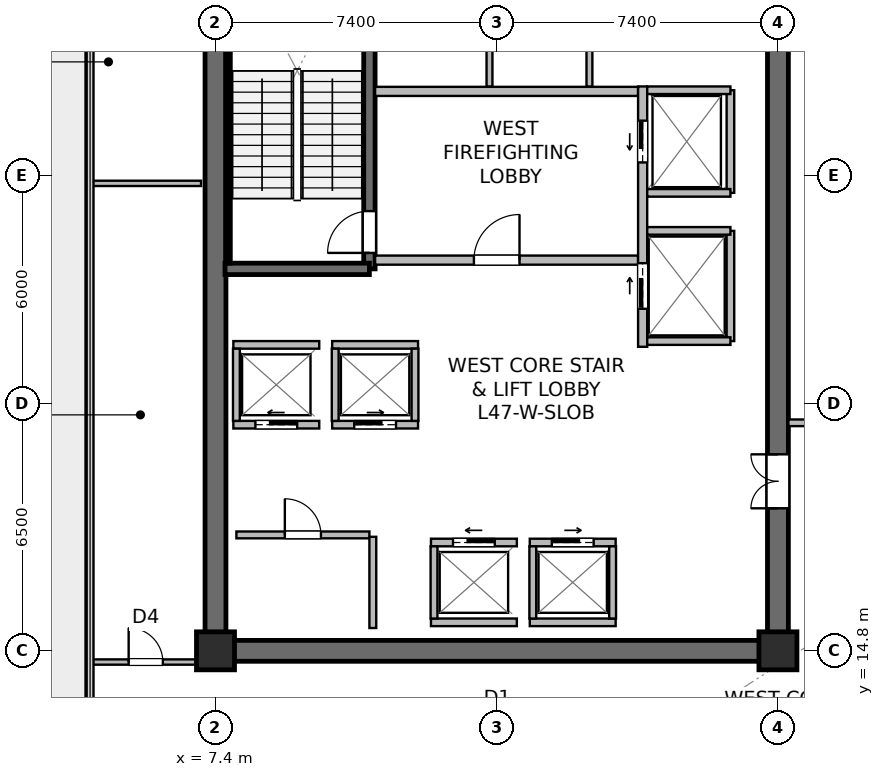
"""IFC4 building model, lengths in metres.
Left out: names, types, materials, properties, quantities, classifications, styles, units other than length and angle.
Written with IfcOpenShell. Run it as: python <this file> out.ifc"""

import sys

from ifc_helpers import new_model, si_unit, direction, frame, frame_2d, origin, origin_2d, place, context, subcontext, project, spatial, rectangle, extrude, source, transform, mapped, element, fill, save


model = new_model("IFC4")
c1 = context("Model", 3, precision=1e-05, world=origin(), true_north=direction((0.0, 1.0)))
c2 = subcontext(c1, "Body", "Model", "MODEL_VIEW")
j1 = project(units=[si_unit("LENGTHUNIT", "METRE"), si_unit("PLANEANGLEUNIT", "RADIAN")], contexts=[c1])
p1 = place(None, origin())
s1 = spatial("IfcSite", under=j1, at=p1, CompositionType="ELEMENT")
p2 = place(p1, origin())
s2 = spatial("IfcBuilding", under=s1, at=p2, CompositionType="ELEMENT")
p3 = place(p2, frame((0.0, 0.0, 196.6)))
s3 = spatial("IfcBuildingStorey", under=s2, at=p3, CompositionType="ELEMENT", Elevation=196.6)
p4 = place(p3, frame((7.125, 14.8, 0.0), z_axis=(0.0, 0.0, 1.0), x_axis=(1.0, 0.0, 0.0)))
e1 = element("IfcWall", 1, at=p4, inside=s3, PredefinedType="SHEAR", context=c2, shape_type="SweptSolid", body=[
    extrude(rectangle(XDim=15.35, YDim=0.55, at=frame_2d((7.675, 0.0))), origin(), (0.0, 0.0, 1.0), 4.5),
])
p5 = place(p3, frame((7.4, 15.075, 0.0), z_axis=(0.0, 0.0, 1.0), x_axis=(0.0, 1.0, 0.0)))
e2 = element("IfcWall", 2, at=p5, inside=s3, PredefinedType="SHEAR", context=c2, shape_type="SweptSolid", body=[
    extrude(rectangle(XDim=18.45, YDim=0.55, at=frame_2d((9.225, 0.0))), origin(), (0.0, 0.0, 1.0), 4.5),
])
p6 = place(p3, frame((22.2, 15.075, 0.0), z_axis=(0.0, 0.0, 1.0), x_axis=(0.0, 1.0, 0.0)))
e3 = element("IfcWall", 3, at=p6, inside=s3, PredefinedType="SHEAR", context=c2, shape_type="SweptSolid", body=[
    extrude(rectangle(XDim=18.45, YDim=0.55, at=frame_2d((9.225, 0.0))), origin(), (0.0, 0.0, 1.0), 4.5),
])
p7 = place(p6, frame((3.475, 0.0, 0.0)))
e4 = element("IfcOpeningElement", 4, at=p7, cuts=e3, PredefinedType="OPENING", context=c2, shape_type="SweptSolid", body=[
    extrude(rectangle(XDim=1.42, YDim=2.2, at=frame_2d((0.71, 1.1))), frame((0.0, 0.285, 0.0), z_axis=(0.0, -1.0, 0.0), x_axis=(1.0, 0.0, 0.0)), (0.0, 0.0, 1.0), 0.57),
])
p8 = place(p3, frame((11.45, 24.85, 0.0), z_axis=(0.0, 0.0, 1.0), x_axis=(0.0, 1.0, 0.0)))
e5 = element("IfcWall", 5, at=p8, inside=s3, PredefinedType="SHEAR", context=c2, shape_type="SweptSolid", body=[
    extrude(rectangle(XDim=8.63, YDim=0.3, at=frame_2d((4.315, 0.0))), origin(), (0.0, 0.0, 1.0), 4.5),
])
p9 = place(p8, frame((0.42, 0.0, 0.0)))
e6 = element("IfcOpeningElement", 6, at=p9, cuts=e5, PredefinedType="OPENING", context=c2, shape_type="SweptSolid", body=[
    extrude(rectangle(XDim=1.1, YDim=2.15, at=frame_2d((0.55, 1.075))), frame((0.0, 0.16, 0.0), z_axis=(0.0, -1.0, 0.0), x_axis=(1.0, 0.0, 0.0)), (0.0, 0.0, 1.0), 0.32),
])
p10 = place(p3, frame((7.65, 24.85, 0.0), z_axis=(0.0, 0.0, 1.0), x_axis=(1.0, 0.0, 0.0)))
e7 = element("IfcWall", 7, at=p10, inside=s3, PredefinedType="SHEAR", context=c2, shape_type="SweptSolid", body=[
    extrude(rectangle(XDim=3.8, YDim=0.3, at=frame_2d((1.9, 0.0))), origin(), (0.0, 0.0, 1.0), 4.5),
])
p11 = place(p3, frame((7.73, 25.0, 0.0), z_axis=(0.0, 0.0, 1.0), x_axis=(0.0, 1.0, 0.0)))
e8 = element("IfcWall", 8, at=p11, inside=s3, PredefinedType="SOLIDWALL", context=c2, shape_type="SweptSolid", body=[
    extrude(rectangle(XDim=8.32, YDim=0.12, at=frame_2d((4.16, 0.0))), origin(), (0.0, 0.0, 1.0), 4.5),
])
m1 = source(origin(), c2, "Body", "SweptSolid", [
    extrude(rectangle(XDim=1.0, YDim=1.0, at=origin_2d()), origin(), (0.0, 0.0, 1.0), 4.8),
])
for number, where, z_axis, x_axis in (
    (9, (7.4, 14.8, 0.0), (0.0, 0.0, 1.0), (1.0, 0.0, 0.0)),
    (10, (22.2, 14.8, 0.0), (0.0, 0.0, 1.0), (1.0, 0.0, 0.0)),
):
    element("IfcColumn", number, at=place(p3, frame(where, z_axis=z_axis, x_axis=x_axis)), inside=s3, PredefinedType="COLUMN", context=c2, shape_type="MappedRepresentation", body=[
        mapped(m1, transform((0.0, 0.0, 0.0), scale=1.0)),
    ])
p12 = place(p3, frame((11.6, 25.08, 0.0), z_axis=(0.0, 0.0, 1.0), x_axis=(1.0, 0.0, 0.0)))
e11 = element("IfcWall", 11, at=p12, inside=s3, PredefinedType="SOLIDWALL", context=c2, shape_type="SweptSolid", body=[
    extrude(rectangle(XDim=6.92, YDim=0.24, at=frame_2d((3.46, 0.0))), origin(), (0.0, 0.0, 1.0), 3.897),
])
p13 = place(p12, frame((2.6, 0.0, 0.0)))
e12 = element("IfcOpeningElement", 12, at=p13, cuts=e11, PredefinedType="OPENING", context=c2, shape_type="SweptSolid", body=[
    extrude(rectangle(XDim=1.2, YDim=2.16, at=frame_2d((0.6, 1.08))), frame((0.0, 0.13, 0.0), z_axis=(0.0, -1.0, 0.0), x_axis=(1.0, 0.0, 0.0)), (0.0, 0.0, 1.0), 0.26),
])
p14 = place(p3, frame((11.6, 29.52, 0.0), z_axis=(0.0, 0.0, 1.0), x_axis=(1.0, 0.0, 0.0)))
e13 = element("IfcWall", 13, at=p14, inside=s3, PredefinedType="SOLIDWALL", context=c2, shape_type="SweptSolid", body=[
    extrude(rectangle(XDim=6.92, YDim=0.24, at=frame_2d((3.46, 0.0))), origin(), (0.0, 0.0, 1.0), 3.897),
])
p15 = place(p3, frame((18.64, 22.8, 0.0), z_axis=(0.0, 0.0, 1.0), x_axis=(0.0, 1.0, 0.0)))
e14 = element("IfcWall", 14, at=p15, inside=s3, PredefinedType="SOLIDWALL", context=c2, shape_type="SweptSolid", body=[
    extrude(rectangle(XDim=6.85, YDim=0.24, at=frame_2d((3.425, 0.0))), origin(), (0.0, 0.0, 1.0), 3.635),
])
p16 = place(p15, frame((4.85, 0.0, 0.0)))
e15 = element("IfcOpeningElement", 15, at=p16, cuts=e14, PredefinedType="OPENING", context=c2, shape_type="SweptSolid", body=[
    extrude(rectangle(XDim=1.1, YDim=2.22, at=frame_2d((0.55, 1.11))), frame((0.0, 0.13, 0.0), z_axis=(0.0, -1.0, 0.0), x_axis=(1.0, 0.0, 0.0)), (0.0, 0.0, 1.0), 0.26),
])
p17 = place(p15, frame((1.0, 0.0, 0.0)))
e16 = element("IfcOpeningElement", 16, at=p17, cuts=e14, PredefinedType="OPENING", context=c2, shape_type="SweptSolid", body=[
    extrude(rectangle(XDim=1.2, YDim=2.22, at=frame_2d((0.6, 1.11))), frame((0.0, 0.13, 0.0), z_axis=(0.0, -1.0, 0.0), x_axis=(1.0, 0.0, 0.0)), (0.0, 0.0, 1.0), 0.26),
])
p18 = place(p3, frame((13.07, 17.65, 0.0), z_axis=(0.0, 0.0, 1.0), x_axis=(1.0, 0.0, 0.0)))
e17 = element("IfcWall", 17, at=p18, inside=s3, PredefinedType="SOLIDWALL", context=c2, shape_type="SweptSolid", body=[
    extrude(rectangle(XDim=2.26, YDim=0.2, at=frame_2d((1.13, 0.0))), origin(), (0.0, 0.0, 1.0), 3.897),
])
p19 = place(p18, frame((0.58, 0.0, 0.0)))
e18 = element("IfcOpeningElement", 18, at=p19, cuts=e17, PredefinedType="OPENING", context=c2, shape_type="SweptSolid", body=[
    extrude(rectangle(XDim=1.1, YDim=2.22, at=frame_2d((0.55, 1.11))), frame((0.0, 0.11, 0.0), z_axis=(0.0, -1.0, 0.0), x_axis=(1.0, 0.0, 0.0)), (0.0, 0.0, 1.0), 0.22),
])
p20 = place(p3, frame((13.07, 15.55, 0.0), z_axis=(0.0, 0.0, 1.0), x_axis=(1.0, 0.0, 0.0)))
e19 = element("IfcWall", 19, at=p20, inside=s3, PredefinedType="SOLIDWALL", context=c2, shape_type="SweptSolid", body=[
    extrude(rectangle(XDim=2.26, YDim=0.2, at=frame_2d((1.13, 0.0))), origin(), (0.0, 0.0, 1.0), 3.897),
])
p21 = place(p3, frame((13.15, 15.65, 0.0), z_axis=(0.0, 0.0, 1.0), x_axis=(0.0, 1.0, 0.0)))
e20 = element("IfcWall", 20, at=p21, inside=s3, PredefinedType="SOLIDWALL", context=c2, shape_type="SweptSolid", body=[
    extrude(rectangle(XDim=1.9, YDim=0.18, at=frame_2d((0.95, 0.0))), origin(), (0.0, 0.0, 1.0), 4.5),
])
p22 = place(p3, frame((15.67, 17.65, 0.0), z_axis=(0.0, 0.0, 1.0), x_axis=(1.0, 0.0, 0.0)))
e21 = element("IfcWall", 21, at=p22, inside=s3, PredefinedType="SOLIDWALL", context=c2, shape_type="SweptSolid", body=[
    extrude(rectangle(XDim=2.26, YDim=0.2, at=frame_2d((1.13, 0.0))), origin(), (0.0, 0.0, 1.0), 4.5),
])
p23 = place(p22, frame((0.58, 0.0, 0.0)))
e22 = element("IfcOpeningElement", 22, at=p23, cuts=e21, PredefinedType="OPENING", context=c2, shape_type="SweptSolid", body=[
    extrude(rectangle(XDim=1.1, YDim=2.22, at=frame_2d((0.55, 1.11))), frame((0.0, 0.11, 0.0), z_axis=(0.0, -1.0, 0.0), x_axis=(1.0, 0.0, 0.0)), (0.0, 0.0, 1.0), 0.22),
])
p24 = place(p3, frame((15.67, 15.55, 0.0), z_axis=(0.0, 0.0, 1.0), x_axis=(1.0, 0.0, 0.0)))
e23 = element("IfcWall", 23, at=p24, inside=s3, PredefinedType="SOLIDWALL", context=c2, shape_type="SweptSolid", body=[
    extrude(rectangle(XDim=2.26, YDim=0.2, at=frame_2d((1.13, 0.0))), origin(), (0.0, 0.0, 1.0), 4.5),
])
for number, where, z_axis, x_axis in (
    (24, (15.75, 15.65, 0.0), (0.0, 0.0, 1.0), (0.0, 1.0, 0.0)),
    (25, (17.85, 15.65, 0.0), (0.0, 0.0, 1.0), (0.0, 1.0, 0.0)),
):
    element("IfcWall", number, at=place(p3, frame(where, z_axis=z_axis, x_axis=x_axis)), inside=s3, PredefinedType="SOLIDWALL", context=c2, shape_type="SweptSolid", body=[
        extrude(rectangle(XDim=1.9, YDim=0.18, at=frame_2d((0.95, 0.0))), origin(), (0.0, 0.0, 1.0), 4.5),
    ])
p25 = place(p3, frame((7.87, 20.75, 0.0), z_axis=(0.0, 0.0, 1.0), x_axis=(1.0, 0.0, 0.0)))
e26 = element("IfcWall", 26, at=p25, inside=s3, PredefinedType="SOLIDWALL", context=c2, shape_type="SweptSolid", body=[
    extrude(rectangle(XDim=2.26, YDim=0.2, at=frame_2d((1.13, 0.0))), origin(), (0.0, 0.0, 1.0), 4.5),
])
p26 = place(p25, frame((0.58, 0.0, 0.0)))
e27 = element("IfcOpeningElement", 27, at=p26, cuts=e26, PredefinedType="OPENING", context=c2, shape_type="SweptSolid", body=[
    extrude(rectangle(XDim=1.1, YDim=2.22, at=frame_2d((0.55, 1.11))), frame((0.0, 0.11, 0.0), z_axis=(0.0, -1.0, 0.0), x_axis=(1.0, 0.0, 0.0)), (0.0, 0.0, 1.0), 0.22),
])
p27 = place(p3, frame((7.87, 22.85, 0.0), z_axis=(0.0, 0.0, 1.0), x_axis=(1.0, 0.0, 0.0)))
e28 = element("IfcWall", 28, at=p27, inside=s3, PredefinedType="SOLIDWALL", context=c2, shape_type="SweptSolid", body=[
    extrude(rectangle(XDim=2.26, YDim=0.2, at=frame_2d((1.13, 0.0))), origin(), (0.0, 0.0, 1.0), 4.5),
])
p28 = place(p3, frame((7.95, 20.85, 0.0), z_axis=(0.0, 0.0, 1.0), x_axis=(0.0, 1.0, 0.0)))
e29 = element("IfcWall", 29, at=p28, inside=s3, PredefinedType="SOLIDWALL", context=c2, shape_type="SweptSolid", body=[
    extrude(rectangle(XDim=1.9, YDim=0.18, at=frame_2d((0.95, 0.0))), origin(), (0.0, 0.0, 1.0), 4.5),
])
p29 = place(p3, frame((10.47, 20.75, 0.0), z_axis=(0.0, 0.0, 1.0), x_axis=(1.0, 0.0, 0.0)))
e30 = element("IfcWall", 30, at=p29, inside=s3, PredefinedType="SOLIDWALL", context=c2, shape_type="SweptSolid", body=[
    extrude(rectangle(XDim=2.26, YDim=0.2, at=frame_2d((1.13, 0.0))), origin(), (0.0, 0.0, 1.0), 4.5),
])
p30 = place(p29, frame((0.58, 0.0, 0.0)))
e31 = element("IfcOpeningElement", 31, at=p30, cuts=e30, PredefinedType="OPENING", context=c2, shape_type="SweptSolid", body=[
    extrude(rectangle(XDim=1.1, YDim=2.22, at=frame_2d((0.55, 1.11))), frame((0.0, 0.11, 0.0), z_axis=(0.0, -1.0, 0.0), x_axis=(1.0, 0.0, 0.0)), (0.0, 0.0, 1.0), 0.22),
])
p31 = place(p3, frame((10.47, 22.85, 0.0), z_axis=(0.0, 0.0, 1.0), x_axis=(1.0, 0.0, 0.0)))
e32 = element("IfcWall", 32, at=p31, inside=s3, PredefinedType="SOLIDWALL", context=c2, shape_type="SweptSolid", body=[
    extrude(rectangle(XDim=2.26, YDim=0.2, at=frame_2d((1.13, 0.0))), origin(), (0.0, 0.0, 1.0), 4.5),
])
for number, where, z_axis, x_axis in (
    (33, (10.55, 20.85, 0.0), (0.0, 0.0, 1.0), (0.0, 1.0, 0.0)),
    (34, (12.65, 20.85, 0.0), (0.0, 0.0, 1.0), (0.0, 1.0, 0.0)),
):
    element("IfcWall", number, at=place(p3, frame(where, z_axis=z_axis, x_axis=x_axis)), inside=s3, PredefinedType="SOLIDWALL", context=c2, shape_type="SweptSolid", body=[
        extrude(rectangle(XDim=1.9, YDim=0.18, at=frame_2d((0.95, 0.0))), origin(), (0.0, 0.0, 1.0), 4.5),
    ])
p32 = place(p3, frame((20.95, 26.85, 0.0), z_axis=(0.0, 0.0, 1.0), x_axis=(0.0, 1.0, 0.0)))
e35 = element("IfcWall", 35, at=p32, inside=s3, PredefinedType="SOLIDWALL", context=c2, shape_type="SweptSolid", body=[
    extrude(rectangle(XDim=2.7, YDim=0.2, at=frame_2d((1.35, 0.0))), origin(), (0.0, 0.0, 1.0), 4.5),
])
p33 = place(p3, frame((18.76, 29.55, 0.0), z_axis=(0.0, 0.0, 1.0), x_axis=(1.0, 0.0, 0.0)))
e36 = element("IfcWall", 36, at=p33, inside=s3, PredefinedType="SOLIDWALL", context=c2, shape_type="SweptSolid", body=[
    extrude(rectangle(XDim=2.19, YDim=0.2, at=frame_2d((1.095, 0.0))), origin(), (0.0, 0.0, 1.0), 4.5),
])
p34 = place(p3, frame((18.76, 26.85, 0.0), z_axis=(0.0, 0.0, 1.0), x_axis=(1.0, 0.0, 0.0)))
e37 = element("IfcWall", 37, at=p34, inside=s3, PredefinedType="SOLIDWALL", context=c2, shape_type="SweptSolid", body=[
    extrude(rectangle(XDim=2.19, YDim=0.2, at=frame_2d((1.095, 0.0))), origin(), (0.0, 0.0, 1.0), 3.897),
])
p35 = place(p3, frame((20.95, 22.95, 0.0), z_axis=(0.0, 0.0, 1.0), x_axis=(0.0, 1.0, 0.0)))
e38 = element("IfcWall", 38, at=p35, inside=s3, PredefinedType="SOLIDWALL", context=c2, shape_type="SweptSolid", body=[
    extrude(rectangle(XDim=2.9, YDim=0.2, at=frame_2d((1.45, 0.0))), origin(), (0.0, 0.0, 1.0), 3.635),
])
for number, where, z_axis, x_axis in (
    (39, (18.76, 25.85, 0.0), (0.0, 0.0, 1.0), (1.0, 0.0, 0.0)),
    (40, (18.76, 22.95, 0.0), (0.0, 0.0, 1.0), (1.0, 0.0, 0.0)),
):
    element("IfcWall", number, at=place(p3, frame(where, z_axis=z_axis, x_axis=x_axis)), inside=s3, PredefinedType="SOLIDWALL", context=c2, shape_type="SweptSolid", body=[
        extrude(rectangle(XDim=2.19, YDim=0.2, at=frame_2d((1.095, 0.0))), origin(), (0.0, 0.0, 1.0), 4.5),
    ])
p36 = place(p3, frame((7.95, 17.85, 0.0), z_axis=(0.0, 0.0, 1.0), x_axis=(1.0, 0.0, 0.0)))
e41 = element("IfcWall", 41, at=p36, inside=s3, PredefinedType="SOLIDWALL", context=c2, shape_type="SweptSolid", body=[
    extrude(rectangle(XDim=3.5, YDim=0.18, at=frame_2d((1.75, 0.0))), origin(), (0.0, 0.0, 1.0), 4.5),
])
p37 = place(p36, frame((1.275, 0.0, 0.0)))
e42 = element("IfcOpeningElement", 42, at=p37, cuts=e41, PredefinedType="OPENING", context=c2, shape_type="SweptSolid", body=[
    extrude(rectangle(XDim=0.95, YDim=2.15, at=frame_2d((0.475, 1.075))), frame((0.0, 0.1, 0.0), z_axis=(0.0, -1.0, 0.0), x_axis=(1.0, 0.0, 0.0)), (0.0, 0.0, 1.0), 0.2),
])
p38 = place(p3, frame((11.54, 15.4, 0.0), z_axis=(0.0, 0.0, 1.0), x_axis=(0.0, 1.0, 0.0)))
e43 = element("IfcWall", 43, at=p38, inside=s3, PredefinedType="SOLIDWALL", context=c2, shape_type="SweptSolid", body=[
    extrude(rectangle(XDim=2.4, YDim=0.18, at=frame_2d((1.2, 0.0))), origin(), (0.0, 0.0, 1.0), 4.5),
])
p39 = place(p3, frame((14.61, 29.65, 0.0), z_axis=(0.0, 0.0, 1.0), x_axis=(0.0, 1.0, 0.0)))
e44 = element("IfcWall", 44, at=p39, inside=s3, PredefinedType="PLUMBINGWALL", context=c2, shape_type="SweptSolid", body=[
    extrude(rectangle(XDim=3.93, YDim=0.155, at=frame_2d((1.965, 0.0))), origin(), (0.0, 0.0, 1.0), 3.897),
])
p40 = place(p3, frame((17.24, 29.65, 0.0), z_axis=(0.0, 0.0, 1.0), x_axis=(0.0, 1.0, 0.0)))
e45 = element("IfcWall", 45, at=p40, inside=s3, PredefinedType="PLUMBINGWALL", context=c2, shape_type="SweptSolid", body=[
    extrude(rectangle(XDim=3.93, YDim=0.155, at=frame_2d((1.965, 0.0))), origin(), (0.0, 0.0, 1.0), 4.5),
])
p41 = place(p3, frame((22.475, 20.8, 0.0), z_axis=(0.0, 0.0, 1.0), x_axis=(1.0, 0.0, 0.0)))
e46 = element("IfcWall", 46, at=p41, inside=s3, PredefinedType="PARTITIONING", context=c2, shape_type="SweptSolid", body=[
    extrude(rectangle(XDim=4.025, YDim=0.175, at=frame_2d((2.012, 0.0))), origin(), (0.0, 0.0, 1.0), 4.5),
])
p42 = place(p41, frame((1.35, 0.0, 0.0)))
e47 = element("IfcOpeningElement", 47, at=p42, cuts=e46, PredefinedType="OPENING", context=c2, shape_type="SweptSolid", body=[
    extrude(rectangle(XDim=0.95, YDim=2.15, at=frame_2d((0.475, 1.075))), frame((0.0, 0.098, 0.0), z_axis=(0.0, -1.0, 0.0), x_axis=(1.0, 0.0, 0.0)), (0.0, 0.0, 1.0), 0.195),
])
p43 = place(p3, frame((4.11, 27.1, 0.0), z_axis=(0.0, 0.0, 1.0), x_axis=(1.0, 0.0, 0.0)))
e48 = element("IfcWall", 48, at=p43, inside=s3, PredefinedType="PARTITIONING", context=c2, shape_type="SweptSolid", body=[
    extrude(rectangle(XDim=2.91, YDim=0.14, at=frame_2d((1.455, 0.0))), origin(), (0.0, 0.0, 1.0), 4.5),
])
p44 = place(p3, frame((4.11, 14.505, 0.0), z_axis=(0.0, 0.0, 1.0), x_axis=(1.0, 0.0, 0.0)))
e49 = element("IfcWall", 49, at=p44, inside=s3, PredefinedType="PARTITIONING", context=c2, shape_type="SweptSolid", body=[
    extrude(rectangle(XDim=2.91, YDim=0.14, at=frame_2d((1.455, 0.0))), origin(), (0.0, 0.0, 1.0), 4.5),
])
p45 = place(p44, frame((1.005, 0.0, 0.0)))
e50 = element("IfcOpeningElement", 50, at=p45, cuts=e49, PredefinedType="OPENING", context=c2, shape_type="SweptSolid", body=[
    extrude(rectangle(XDim=0.9, YDim=2.1, at=frame_2d((0.45, 1.05))), frame((0.0, 0.08, 0.0), z_axis=(0.0, -1.0, 0.0), x_axis=(1.0, 0.0, 0.0)), (0.0, 0.0, 1.0), 0.16),
])
m2 = source(origin(), c2, "Body", "SweptSolid", [
    extrude(rectangle(XDim=1.1, YDim=2.15, at=frame_2d((0.55, 1.075))), frame((0.0, 0.025, 0.0), z_axis=(0.0, -1.0, 0.0), x_axis=(1.0, 0.0, 0.0)), (0.0, 0.0, 1.0), 0.05),
])
p46 = place(p9, origin())
e51 = element("IfcDoor", 51, at=p46, inside=s3, OperationType="SINGLE_SWING_LEFT", PredefinedType="DOOR", context=c2, shape_type="MappedRepresentation", body=[
    mapped(m2, transform((0.0, 0.0, 0.0), scale=1.0)),
])
fill(e6, e51)
m3 = source(origin(), c2, "Body", "SweptSolid", [
    extrude(rectangle(XDim=1.2, YDim=2.16, at=frame_2d((0.6, 1.08))), frame((0.0, 0.025, 0.0), z_axis=(0.0, -1.0, 0.0), x_axis=(1.0, 0.0, 0.0)), (0.0, 0.0, 1.0), 0.05),
])
p47 = place(p13, origin())
e52 = element("IfcDoor", 52, at=p47, inside=s3, OperationType="SINGLE_SWING_RIGHT", PredefinedType="DOOR", context=c2, shape_type="MappedRepresentation", body=[
    mapped(m3, transform((0.0, 0.0, 0.0), scale=1.0)),
])
fill(e12, e52)
m4 = source(origin(), c2, "Body", "SweptSolid", [
    extrude(rectangle(XDim=1.1, YDim=2.22, at=frame_2d((0.55, 1.11))), frame((0.0, 0.025, 0.0), z_axis=(0.0, -1.0, 0.0), x_axis=(1.0, 0.0, 0.0)), (0.0, 0.0, 1.0), 0.05),
])
p48 = place(p19, origin())
e53 = element("IfcDoor", 53, at=p48, inside=s3, OperationType="SLIDING_TO_LEFT", PredefinedType="USERDEFINED", context=c2, shape_type="MappedRepresentation", body=[
    mapped(m4, transform((0.0, 0.0, 0.0), scale=1.0)),
])
fill(e18, e53)
p49 = place(p23, origin())
e54 = element("IfcDoor", 54, at=p49, inside=s3, OperationType="SLIDING_TO_RIGHT", PredefinedType="USERDEFINED", context=c2, shape_type="MappedRepresentation", body=[
    mapped(m4, transform((0.0, 0.0, 0.0), scale=1.0)),
])
fill(e22, e54)
p50 = place(p26, origin())
e55 = element("IfcDoor", 55, at=p50, inside=s3, OperationType="SLIDING_TO_LEFT", PredefinedType="USERDEFINED", context=c2, shape_type="MappedRepresentation", body=[
    mapped(m4, transform((0.0, 0.0, 0.0), scale=1.0)),
])
fill(e27, e55)
p51 = place(p30, origin())
e56 = element("IfcDoor", 56, at=p51, inside=s3, OperationType="SLIDING_TO_RIGHT", PredefinedType="USERDEFINED", context=c2, shape_type="MappedRepresentation", body=[
    mapped(m4, transform((0.0, 0.0, 0.0), scale=1.0)),
])
fill(e31, e56)
p52 = place(p16, origin())
e57 = element("IfcDoor", 57, at=p52, inside=s3, OperationType="SLIDING_TO_LEFT", PredefinedType="USERDEFINED", context=c2, shape_type="MappedRepresentation", body=[
    mapped(m4, transform((0.0, 0.0, 0.0), scale=1.0)),
])
fill(e15, e57)
m5 = source(origin(), c2, "Body", "SweptSolid", [
    extrude(rectangle(XDim=1.2, YDim=2.22, at=frame_2d((0.6, 1.11))), frame((0.0, 0.025, 0.0), z_axis=(0.0, -1.0, 0.0), x_axis=(1.0, 0.0, 0.0)), (0.0, 0.0, 1.0), 0.05),
])
p53 = place(p17, origin())
e58 = element("IfcDoor", 58, at=p53, inside=s3, OperationType="SLIDING_TO_RIGHT", PredefinedType="USERDEFINED", context=c2, shape_type="MappedRepresentation", body=[
    mapped(m5, transform((0.0, 0.0, 0.0), scale=1.0)),
])
fill(e16, e58)
m6 = source(origin(), c2, "Body", "SweptSolid", [
    extrude(rectangle(XDim=0.95, YDim=2.15, at=frame_2d((0.475, 1.075))), frame((0.0, 0.025, 0.0), z_axis=(0.0, -1.0, 0.0), x_axis=(1.0, 0.0, 0.0)), (0.0, 0.0, 1.0), 0.05),
])
p54 = place(p37, origin())
e59 = element("IfcDoor", 59, at=p54, inside=s3, OperationType="SINGLE_SWING_LEFT", PredefinedType="DOOR", context=c2, shape_type="MappedRepresentation", body=[
    mapped(m6, transform((0.0, 0.0, 0.0), scale=1.0)),
])
fill(e42, e59)
m7 = source(origin(), c2, "Body", "SweptSolid", [
    extrude(rectangle(XDim=1.42, YDim=2.2, at=frame_2d((0.71, 1.1))), frame((0.0, 0.025, 0.0), z_axis=(0.0, -1.0, 0.0), x_axis=(1.0, 0.0, 0.0)), (0.0, 0.0, 1.0), 0.05),
])
p55 = place(p7, origin())
e60 = element("IfcDoor", 60, at=p55, inside=s3, OperationType="DOUBLE_DOOR_SINGLE_SWING", PredefinedType="DOOR", context=c2, shape_type="MappedRepresentation", body=[
    mapped(m7, transform((0.0, 0.0, 0.0), scale=1.0)),
])
fill(e4, e60)
m8 = source(origin(), c2, "Body", "SweptSolid", [
    extrude(rectangle(XDim=0.9, YDim=2.1, at=frame_2d((0.45, 1.05))), frame((0.0, 0.025, 0.0), z_axis=(0.0, -1.0, 0.0), x_axis=(1.0, 0.0, 0.0)), (0.0, 0.0, 1.0), 0.05),
])
p56 = place(p45, origin())
e61 = element("IfcDoor", 61, at=p56, inside=s3, OperationType="SINGLE_SWING_LEFT", PredefinedType="DOOR", context=c2, shape_type="MappedRepresentation", body=[
    mapped(m8, transform((0.0, 0.0, 0.0), scale=1.0)),
])
fill(e50, e61)
save(model, sys.argv[1])
